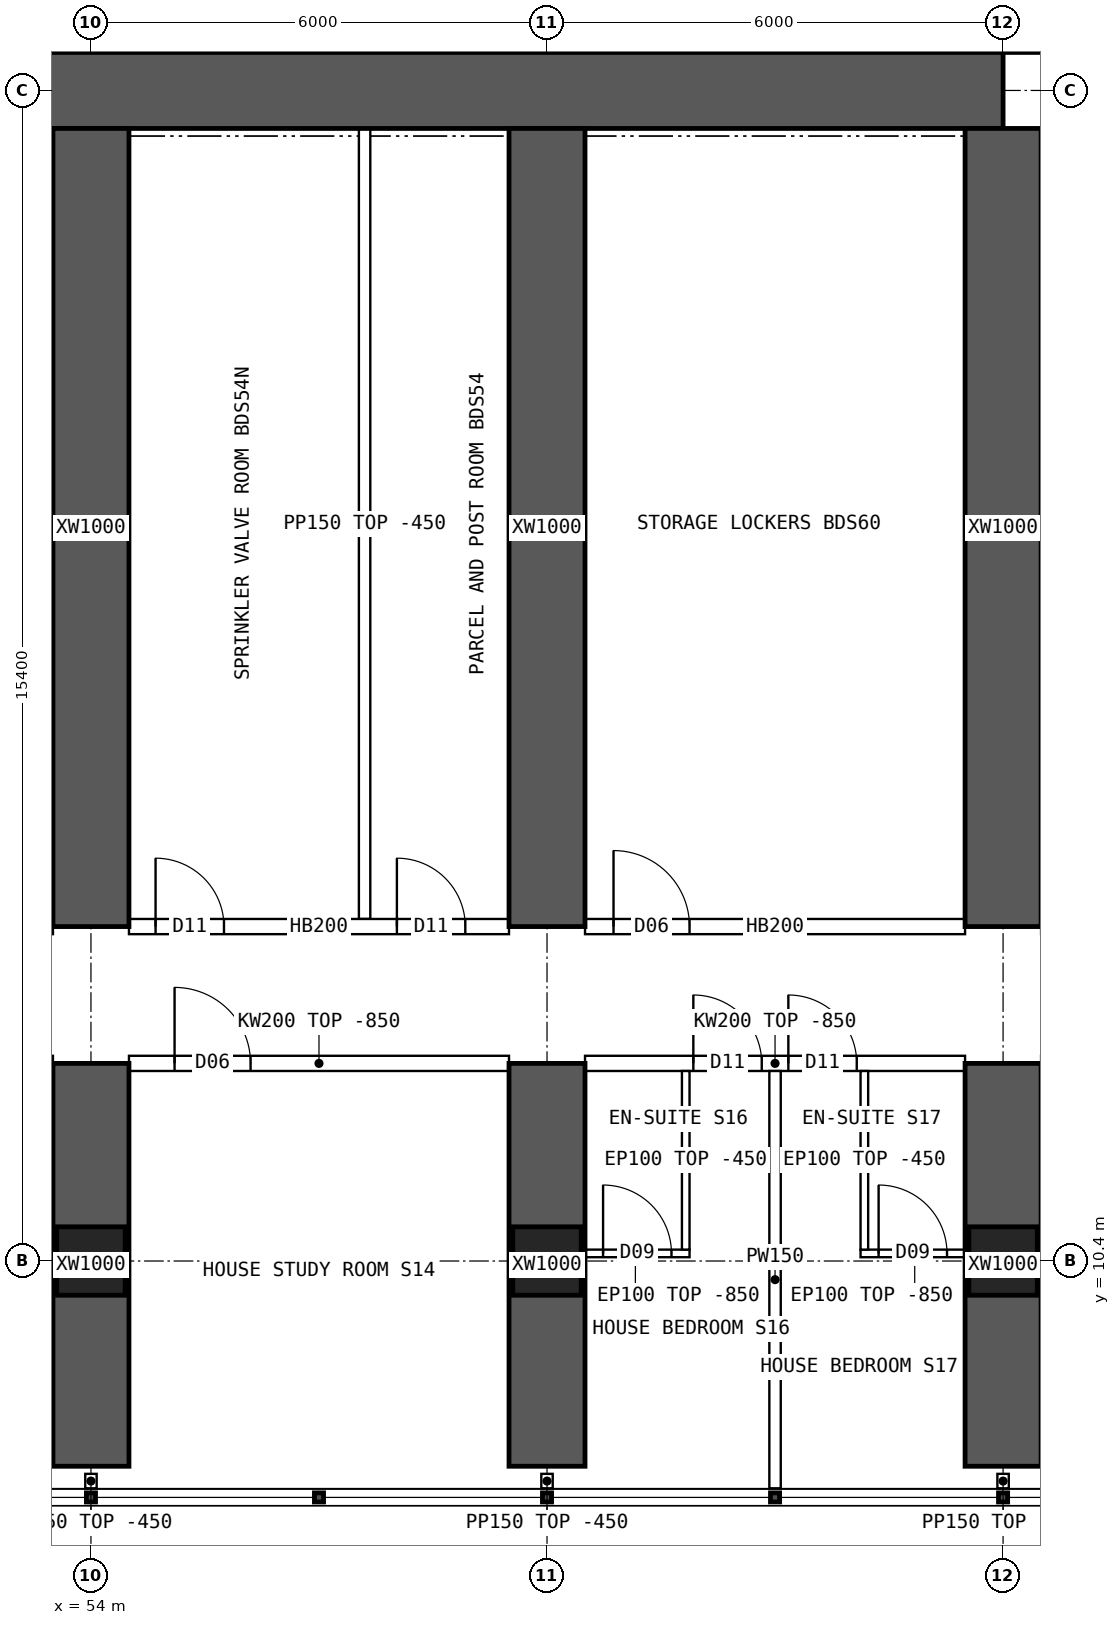
"""IFC4 building model, lengths in metres.
Left out: names, types, materials, properties, quantities, classifications, styles, units other than length and angle.
Written with IfcOpenShell. Run it as: python <this file> out.ifc"""

import sys

from ifc_helpers import new_model, si_unit, direction, frame, frame_2d, origin, origin_2d, place, context, subcontext, project, spatial, polyline, rectangle, hollow_rectangle, outline, extrude, element, fill, save


model = new_model("IFC4")
c1 = context("Model", 3, precision=1e-05, world=origin(), true_north=direction((0.0, 1.0)))
c2 = subcontext(c1, "Body", "Model", "MODEL_VIEW")
j1 = project(units=[si_unit("LENGTHUNIT", "METRE"), si_unit("PLANEANGLEUNIT", "RADIAN")], contexts=[c1])
p1 = place(None, origin())
s1 = spatial("IfcSite", under=j1, at=p1, CompositionType="ELEMENT")
p2 = place(p1, origin())
s2 = spatial("IfcBuilding", under=s1, at=p2, CompositionType="ELEMENT")
p3 = place(p2, frame((0.0, 0.0, 20.2)))
s3 = spatial("IfcBuildingStorey", under=s2, at=p3, CompositionType="ELEMENT", Elevation=20.2)
for number, where, z_axis, x_axis in (
    (1, (54.0, 10.4, 0.0), (0.0, 0.0, 1.0), (1.0, 0.0, 0.0)),
    (2, (60.0, 10.4, 0.0), (0.0, 0.0, 1.0), (1.0, 0.0, 0.0)),
    (3, (66.0, 10.4, 0.0), (0.0, 0.0, 1.0), (1.0, 0.0, 0.0)),
):
    element("IfcColumn", number, at=place(p3, frame(where, z_axis=z_axis, x_axis=x_axis)), inside=s3, PredefinedType="COLUMN", context=c2, shape_type="SweptSolid", body=[
        extrude(hollow_rectangle(XDim=0.9, YDim=0.9, WallThickness=0.09, at=origin_2d()), origin(), (0.0, 0.0, 1.0), 3.75),
    ])
p4 = place(p3, frame((18.0, 25.8, 0.0), z_axis=(0.0, 0.0, 1.0), x_axis=(1.0, 0.0, 0.0)))
e4 = element("IfcWall", 4, at=p4, inside=s3, PredefinedType="SHEAR", context=c2, shape_type="SweptSolid", body=[
    extrude(rectangle(XDim=48.0, YDim=1.0, at=frame_2d((24.0, 0.0))), origin(), (0.0, 0.0, 1.0), 3.75),
])
p5 = place(p3, frame((54.0, 7.7, 0.0), z_axis=(0.0, 0.0, 1.0), x_axis=(0.0, 1.0, 0.0)))
e5 = element("IfcWall", 5, at=p5, inside=s3, PredefinedType="SHEAR", context=c2, shape_type="SweptSolid", body=[
    extrude(rectangle(XDim=5.3, YDim=1.0, at=frame_2d((2.65, 0.0))), origin(), (0.0, 0.0, 1.0), 3.75),
])
p6 = place(p3, frame((54.0, 14.8, 0.0), z_axis=(0.0, 0.0, 1.0), x_axis=(0.0, 1.0, 0.0)))
e6 = element("IfcWall", 6, at=p6, inside=s3, PredefinedType="SHEAR", context=c2, shape_type="SweptSolid", body=[
    extrude(rectangle(XDim=10.5, YDim=1.0, at=frame_2d((5.25, 0.0))), origin(), (0.0, 0.0, 1.0), 3.75),
])
p7 = place(p3, frame((60.0, 7.7, 0.0), z_axis=(0.0, 0.0, 1.0), x_axis=(0.0, 1.0, 0.0)))
e7 = element("IfcWall", 7, at=p7, inside=s3, PredefinedType="SHEAR", context=c2, shape_type="SweptSolid", body=[
    extrude(rectangle(XDim=5.3, YDim=1.0, at=frame_2d((2.65, 0.0))), origin(), (0.0, 0.0, 1.0), 3.75),
])
p8 = place(p3, frame((60.0, 14.8, 0.0), z_axis=(0.0, 0.0, 1.0), x_axis=(0.0, 1.0, 0.0)))
e8 = element("IfcWall", 8, at=p8, inside=s3, PredefinedType="SHEAR", context=c2, shape_type="SweptSolid", body=[
    extrude(rectangle(XDim=10.5, YDim=1.0, at=frame_2d((5.25, 0.0))), origin(), (0.0, 0.0, 1.0), 3.75),
])
p9 = place(p3, frame((66.0, 7.7, 0.0), z_axis=(0.0, 0.0, 1.0), x_axis=(0.0, 1.0, 0.0)))
e9 = element("IfcWall", 9, at=p9, inside=s3, PredefinedType="SHEAR", context=c2, shape_type="SweptSolid", body=[
    extrude(rectangle(XDim=5.3, YDim=1.0, at=frame_2d((2.65, 0.0))), origin(), (0.0, 0.0, 1.0), 3.75),
])
p10 = place(p3, frame((66.0, 14.8, 0.0), z_axis=(0.0, 0.0, 1.0), x_axis=(0.0, 1.0, 0.0)))
e10 = element("IfcWall", 10, at=p10, inside=s3, PredefinedType="SHEAR", context=c2, shape_type="SweptSolid", body=[
    extrude(rectangle(XDim=10.5, YDim=1.0, at=frame_2d((5.25, 0.0))), origin(), (0.0, 0.0, 1.0), 3.75),
])
p11 = place(p3, frame((54.5, 13.0, 0.0), z_axis=(0.0, 0.0, 1.0), x_axis=(1.0, 0.0, 0.0)))
e11 = element("IfcWall", 11, at=p11, inside=s3, PredefinedType="SOLIDWALL", context=c2, shape_type="SweptSolid", body=[
    extrude(outline(polyline([(0.0, 0.0), (5.0, 0.0), (5.0, 2.9), (0.0, 2.9), (0.0, 0.0)])), frame((0.0, 0.1, 0.0), z_axis=(0.0, -1.0, 0.0), x_axis=(1.0, 0.0, 0.0)), (0.0, 0.0, 1.0), 0.2),
])
p12 = place(p11, frame((0.6, 0.0, 0.0)))
e12 = element("IfcOpeningElement", 12, at=p12, cuts=e11, PredefinedType="OPENING", context=c2, shape_type="SweptSolid", body=[
    extrude(rectangle(XDim=1.0, YDim=2.1, at=frame_2d((0.5, 1.05))), frame((0.0, 0.11, 0.0), z_axis=(0.0, -1.0, 0.0), x_axis=(1.0, 0.0, 0.0)), (0.0, 0.0, 1.0), 0.22),
])
p13 = place(p3, frame((54.5, 14.8, 0.0), z_axis=(0.0, 0.0, 1.0), x_axis=(1.0, 0.0, 0.0)))
e13 = element("IfcWall", 13, at=p13, inside=s3, PredefinedType="SOLIDWALL", context=c2, shape_type="SweptSolid", body=[
    extrude(rectangle(XDim=5.0, YDim=0.2, at=frame_2d((2.5, 0.0))), origin(), (0.0, 0.0, 1.0), 3.3),
])
p14 = place(p13, frame((0.35, 0.0, 0.0)))
e14 = element("IfcOpeningElement", 14, at=p14, cuts=e13, PredefinedType="OPENING", context=c2, shape_type="SweptSolid", body=[
    extrude(rectangle(XDim=0.9, YDim=2.1, at=frame_2d((0.45, 1.05))), frame((0.0, 0.11, 0.0), z_axis=(0.0, -1.0, 0.0), x_axis=(1.0, 0.0, 0.0)), (0.0, 0.0, 1.0), 0.22),
])
p15 = place(p13, frame((3.525, 0.0, 0.0)))
e15 = element("IfcOpeningElement", 15, at=p15, cuts=e13, PredefinedType="OPENING", context=c2, shape_type="SweptSolid", body=[
    extrude(rectangle(XDim=0.9, YDim=2.1, at=frame_2d((0.45, 1.05))), frame((0.0, 0.11, 0.0), z_axis=(0.0, -1.0, 0.0), x_axis=(1.0, 0.0, 0.0)), (0.0, 0.0, 1.0), 0.22),
])
p16 = place(p3, frame((60.5, 13.0, 0.0), z_axis=(0.0, 0.0, 1.0), x_axis=(1.0, 0.0, 0.0)))
e16 = element("IfcWall", 16, at=p16, inside=s3, PredefinedType="SOLIDWALL", context=c2, shape_type="SweptSolid", body=[
    extrude(outline(polyline([(0.0, 0.0), (5.0, 0.0), (5.0, 2.9), (0.0, 2.9), (0.0, 0.0)])), frame((0.0, 0.1, 0.0), z_axis=(0.0, -1.0, 0.0), x_axis=(1.0, 0.0, 0.0)), (0.0, 0.0, 1.0), 0.2),
])
p17 = place(p16, frame((1.425, 0.0, 0.0)))
e17 = element("IfcOpeningElement", 17, at=p17, cuts=e16, PredefinedType="OPENING", context=c2, shape_type="SweptSolid", body=[
    extrude(rectangle(XDim=0.9, YDim=2.1, at=frame_2d((0.45, 1.05))), frame((0.0, 0.11, 0.0), z_axis=(0.0, -1.0, 0.0), x_axis=(1.0, 0.0, 0.0)), (0.0, 0.0, 1.0), 0.22),
])
p18 = place(p16, frame((2.675, 0.0, 0.0)))
e18 = element("IfcOpeningElement", 18, at=p18, cuts=e16, PredefinedType="OPENING", context=c2, shape_type="SweptSolid", body=[
    extrude(rectangle(XDim=0.9, YDim=2.1, at=frame_2d((0.45, 1.05))), frame((0.0, 0.11, 0.0), z_axis=(0.0, -1.0, 0.0), x_axis=(1.0, 0.0, 0.0)), (0.0, 0.0, 1.0), 0.22),
])
p19 = place(p3, frame((60.5, 14.8, 0.0), z_axis=(0.0, 0.0, 1.0), x_axis=(1.0, 0.0, 0.0)))
e19 = element("IfcWall", 19, at=p19, inside=s3, PredefinedType="SOLIDWALL", context=c2, shape_type="SweptSolid", body=[
    extrude(rectangle(XDim=5.0, YDim=0.2, at=frame_2d((2.5, 0.0))), origin(), (0.0, 0.0, 1.0), 3.3),
])
p20 = place(p19, frame((0.375, 0.0, 0.0)))
e20 = element("IfcOpeningElement", 20, at=p20, cuts=e19, PredefinedType="OPENING", context=c2, shape_type="SweptSolid", body=[
    extrude(rectangle(XDim=1.0, YDim=2.1, at=frame_2d((0.5, 1.05))), frame((0.0, 0.11, 0.0), z_axis=(0.0, -1.0, 0.0), x_axis=(1.0, 0.0, 0.0)), (0.0, 0.0, 1.0), 0.22),
])
p21 = place(p3, frame((53.55, 10.5, 0.0), z_axis=(0.0, 0.0, 1.0), x_axis=(-1.0, 0.0, 0.0)))
e21 = element("IfcWall", 21, at=p21, inside=s3, PredefinedType="PARTITIONING", context=c2, shape_type="SweptSolid", body=[
    extrude(outline(polyline([(0.0, 0.0), (1.425, 0.0), (1.425, 2.9), (0.0, 2.9), (0.0, 0.0)])), frame((0.0, 0.05, 0.0), z_axis=(0.0, -1.0, 0.0), x_axis=(1.0, 0.0, 0.0)), (0.0, 0.0, 1.0), 0.1),
])
p22 = place(p21, frame((0.288, 0.0, 0.0)))
e22 = element("IfcOpeningElement", 22, at=p22, cuts=e21, PredefinedType="OPENING", context=c2, shape_type="SweptSolid", body=[
    extrude(rectangle(XDim=0.9, YDim=2.1, at=frame_2d((0.45, 1.05))), frame((0.0, 0.06, 0.0), z_axis=(0.0, -1.0, 0.0), x_axis=(1.0, 0.0, 0.0)), (0.0, 0.0, 1.0), 0.12),
])
p23 = place(p3, frame((63.0, 7.41, 0.0), z_axis=(0.0, 0.0, 1.0), x_axis=(0.0, 1.0, 0.0)))
e23 = element("IfcWall", 23, at=p23, inside=s3, PredefinedType="PARTITIONING", context=c2, shape_type="SweptSolid", body=[
    extrude(outline(polyline([(0.0, 0.0), (5.49, 0.0), (5.49, 2.9), (5.442, 2.9), (5.44, 3.3), (3.192, 3.3), (3.19, 2.9), (2.792, 2.9), (2.79, 3.3), (0.0, 3.3), (0.0, 0.0)])), frame((0.0, 0.075, 0.0), z_axis=(0.0, -1.0, 0.0), x_axis=(1.0, 0.0, 0.0)), (0.0, 0.0, 1.0), 0.15),
])
p24 = place(p3, frame((61.875, 10.5, 0.0), z_axis=(0.0, 0.0, 1.0), x_axis=(-1.0, 0.0, 0.0)))
e24 = element("IfcWall", 24, at=p24, inside=s3, PredefinedType="PARTITIONING", context=c2, shape_type="SweptSolid", body=[
    extrude(outline(polyline([(0.0, 0.0), (1.425, 0.0), (1.425, 2.9), (0.0, 2.9), (0.0, 0.0)])), frame((0.0, 0.05, 0.0), z_axis=(0.0, -1.0, 0.0), x_axis=(1.0, 0.0, 0.0)), (0.0, 0.0, 1.0), 0.1),
])
p25 = place(p24, frame((0.238, 0.0, 0.0)))
e25 = element("IfcOpeningElement", 25, at=p25, cuts=e24, PredefinedType="OPENING", context=c2, shape_type="SweptSolid", body=[
    extrude(rectangle(XDim=0.9, YDim=2.1, at=frame_2d((0.45, 1.05))), frame((0.0, 0.06, 0.0), z_axis=(0.0, -1.0, 0.0), x_axis=(1.0, 0.0, 0.0)), (0.0, 0.0, 1.0), 0.12),
])
p26 = place(p3, frame((61.825, 10.55, 0.0), z_axis=(0.0, 0.0, 1.0), x_axis=(0.0, 1.0, 0.0)))
e26 = element("IfcWall", 26, at=p26, inside=s3, PredefinedType="PARTITIONING", context=c2, shape_type="SweptSolid", body=[
    extrude(outline(polyline([(0.0, 0.0), (2.35, 0.0), (2.35, 2.9), (2.302, 2.9), (2.3, 3.3), (0.052, 3.3), (0.05, 2.9), (0.0, 2.9), (0.0, 0.0)])), frame((0.0, 0.05, 0.0), z_axis=(0.0, -1.0, 0.0), x_axis=(1.0, 0.0, 0.0)), (0.0, 0.0, 1.0), 0.1),
])
p27 = place(p3, frame((65.55, 10.5, 0.0), z_axis=(0.0, 0.0, 1.0), x_axis=(-1.0, 0.0, 0.0)))
e27 = element("IfcWall", 27, at=p27, inside=s3, PredefinedType="PARTITIONING", context=c2, shape_type="SweptSolid", body=[
    extrude(outline(polyline([(0.0, 0.0), (1.425, 0.0), (1.425, 2.9), (0.0, 2.9), (0.0, 0.0)])), frame((0.0, 0.05, 0.0), z_axis=(0.0, -1.0, 0.0), x_axis=(1.0, 0.0, 0.0)), (0.0, 0.0, 1.0), 0.1),
])
p28 = place(p27, frame((0.288, 0.0, 0.0)))
e28 = element("IfcOpeningElement", 28, at=p28, cuts=e27, PredefinedType="OPENING", context=c2, shape_type="SweptSolid", body=[
    extrude(rectangle(XDim=0.9, YDim=2.1, at=frame_2d((0.45, 1.05))), frame((0.0, 0.06, 0.0), z_axis=(0.0, -1.0, 0.0), x_axis=(1.0, 0.0, 0.0)), (0.0, 0.0, 1.0), 0.12),
])
p29 = place(p3, frame((64.175, 10.55, 0.0), z_axis=(0.0, 0.0, 1.0), x_axis=(0.0, 1.0, 0.0)))
e29 = element("IfcWall", 29, at=p29, inside=s3, PredefinedType="PARTITIONING", context=c2, shape_type="SweptSolid", body=[
    extrude(outline(polyline([(0.0, 0.0), (2.35, 0.0), (2.35, 2.9), (2.302, 2.9), (2.3, 3.3), (0.052, 3.3), (0.05, 2.9), (0.0, 2.9), (0.0, 0.0)])), frame((0.0, 0.05, 0.0), z_axis=(0.0, -1.0, 0.0), x_axis=(1.0, 0.0, 0.0)), (0.0, 0.0, 1.0), 0.1),
])
p30 = place(p3, frame((67.875, 10.5, 0.0), z_axis=(0.0, 0.0, 1.0), x_axis=(-1.0, 0.0, 0.0)))
e30 = element("IfcWall", 30, at=p30, inside=s3, PredefinedType="PARTITIONING", context=c2, shape_type="SweptSolid", body=[
    extrude(outline(polyline([(0.0, 0.0), (1.425, 0.0), (1.425, 2.9), (0.0, 2.9), (0.0, 0.0)])), frame((0.0, 0.05, 0.0), z_axis=(0.0, -1.0, 0.0), x_axis=(1.0, 0.0, 0.0)), (0.0, 0.0, 1.0), 0.1),
])
p31 = place(p30, frame((0.238, 0.0, 0.0)))
e31 = element("IfcOpeningElement", 31, at=p31, cuts=e30, PredefinedType="OPENING", context=c2, shape_type="SweptSolid", body=[
    extrude(rectangle(XDim=0.9, YDim=2.1, at=frame_2d((0.45, 1.05))), frame((0.0, 0.06, 0.0), z_axis=(0.0, -1.0, 0.0), x_axis=(1.0, 0.0, 0.0)), (0.0, 0.0, 1.0), 0.12),
])
p32 = place(p3, frame((57.6, 14.9, 0.0), z_axis=(0.0, 0.0, 1.0), x_axis=(0.0, 1.0, 0.0)))
e32 = element("IfcWall", 32, at=p32, inside=s3, PredefinedType="PARTITIONING", context=c2, shape_type="SweptSolid", body=[
    extrude(rectangle(XDim=10.4, YDim=0.15, at=frame_2d((5.2, 0.0))), origin(), (0.0, 0.0, 1.0), 3.3),
])
for number, where, z_axis, x_axis in (
    (33, (54.0, 7.6, 0.0), (0.0, 0.0, 1.0), (0.0, -1.0, 0.0)),
    (34, (60.0, 7.6, 0.0), (0.0, 0.0, 1.0), (0.0, -1.0, 0.0)),
    (35, (66.0, 7.6, 0.0), (0.0, 0.0, 1.0), (0.0, -1.0, 0.0)),
):
    element("IfcWall", number, at=place(p3, frame(where, z_axis=z_axis, x_axis=x_axis)), inside=s3, PredefinedType="PARTITIONING", context=c2, shape_type="SweptSolid", body=[
        extrude(rectangle(XDim=0.19, YDim=0.15, at=frame_2d((0.095, 0.0))), origin(), (0.0, 0.0, 1.0), 3.3),
    ])
p33 = place(p12, origin())
e36 = element("IfcDoor", 36, at=p33, inside=s3, OperationType="SINGLE_SWING_LEFT", PredefinedType="DOOR", context=c2, shape_type="SweptSolid", body=[
    extrude(rectangle(XDim=1.0, YDim=2.1, at=frame_2d((0.5, 1.05))), frame((0.0, 0.025, 0.0), z_axis=(0.0, -1.0, 0.0), x_axis=(1.0, 0.0, 0.0)), (0.0, 0.0, 1.0), 0.05),
])
fill(e12, e36)
p34 = place(p25, origin())
e37 = element("IfcDoor", 37, at=p34, inside=s3, OperationType="SINGLE_SWING_RIGHT", PredefinedType="DOOR", context=c2, shape_type="SweptSolid", body=[
    extrude(rectangle(XDim=0.9, YDim=2.1, at=frame_2d((0.45, 1.05))), frame((0.0, 0.025, 0.0), z_axis=(0.0, -1.0, 0.0), x_axis=(1.0, 0.0, 0.0)), (0.0, 0.0, 1.0), 0.05),
])
fill(e25, e37)
p35 = place(p17, origin())
e38 = element("IfcDoor", 38, at=p35, inside=s3, OperationType="SINGLE_SWING_LEFT", PredefinedType="DOOR", context=c2, shape_type="SweptSolid", body=[
    extrude(rectangle(XDim=0.9, YDim=2.1, at=frame_2d((0.45, 1.05))), frame((0.0, 0.025, 0.0), z_axis=(0.0, -1.0, 0.0), x_axis=(1.0, 0.0, 0.0)), (0.0, 0.0, 1.0), 0.05),
])
fill(e17, e38)
p36 = place(p28, origin())
e39 = element("IfcDoor", 39, at=p36, inside=s3, OperationType="SINGLE_SWING_RIGHT", PredefinedType="DOOR", context=c2, shape_type="SweptSolid", body=[
    extrude(rectangle(XDim=0.9, YDim=2.1, at=frame_2d((0.45, 1.05))), frame((0.0, 0.025, 0.0), z_axis=(0.0, -1.0, 0.0), x_axis=(1.0, 0.0, 0.0)), (0.0, 0.0, 1.0), 0.05),
])
fill(e28, e39)
p37 = place(p18, origin())
e40 = element("IfcDoor", 40, at=p37, inside=s3, OperationType="SINGLE_SWING_LEFT", PredefinedType="DOOR", context=c2, shape_type="SweptSolid", body=[
    extrude(rectangle(XDim=0.9, YDim=2.1, at=frame_2d((0.45, 1.05))), frame((0.0, 0.025, 0.0), z_axis=(0.0, -1.0, 0.0), x_axis=(1.0, 0.0, 0.0)), (0.0, 0.0, 1.0), 0.05),
])
fill(e18, e40)
p38 = place(p14, origin())
e41 = element("IfcDoor", 41, at=p38, inside=s3, OperationType="SINGLE_SWING_LEFT", PredefinedType="DOOR", context=c2, shape_type="SweptSolid", body=[
    extrude(rectangle(XDim=0.9, YDim=2.1, at=frame_2d((0.45, 1.05))), frame((0.0, 0.025, 0.0), z_axis=(0.0, -1.0, 0.0), x_axis=(1.0, 0.0, 0.0)), (0.0, 0.0, 1.0), 0.05),
])
fill(e14, e41)
p39 = place(p15, origin())
e42 = element("IfcDoor", 42, at=p39, inside=s3, OperationType="SINGLE_SWING_LEFT", PredefinedType="DOOR", context=c2, shape_type="SweptSolid", body=[
    extrude(rectangle(XDim=0.9, YDim=2.1, at=frame_2d((0.45, 1.05))), frame((0.0, 0.025, 0.0), z_axis=(0.0, -1.0, 0.0), x_axis=(1.0, 0.0, 0.0)), (0.0, 0.0, 1.0), 0.05),
])
fill(e15, e42)
p40 = place(p20, origin())
e43 = element("IfcDoor", 43, at=p40, inside=s3, OperationType="SINGLE_SWING_LEFT", PredefinedType="DOOR", context=c2, shape_type="SweptSolid", body=[
    extrude(rectangle(XDim=1.0, YDim=2.1, at=frame_2d((0.5, 1.05))), frame((0.0, 0.025, 0.0), z_axis=(0.0, -1.0, 0.0), x_axis=(1.0, 0.0, 0.0)), (0.0, 0.0, 1.0), 0.05),
])
fill(e20, e43)
save(model, sys.argv[1])
